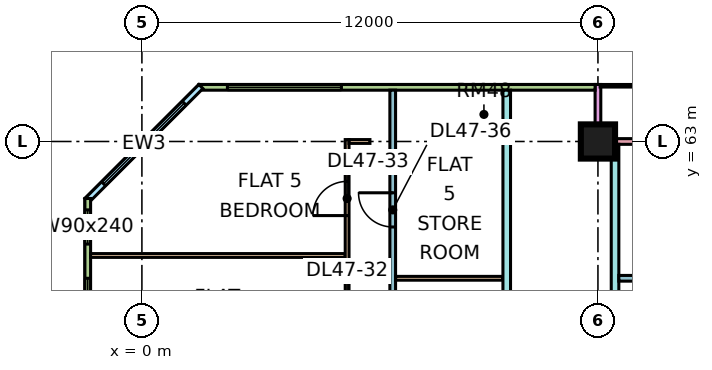
"""IFC4 building model, lengths in metres.
Left out: names, types, materials, properties, quantities, classifications, styles, units other than length and angle.
Written with IfcOpenShell. Run it as: python <this file> out.ifc"""

import sys

from ifc_helpers import new_model, si_unit, direction, frame, frame_2d, origin, origin_2d, place, context, subcontext, project, spatial, rectangle, extrude, element, fill, save


model = new_model("IFC4")
c1 = context("Model", 3, precision=1e-05, world=origin(), true_north=direction((0.0, 1.0)))
c2 = subcontext(c1, "Body", "Model", "MODEL_VIEW")
j1 = project(units=[si_unit("LENGTHUNIT", "METRE"), si_unit("PLANEANGLEUNIT", "RADIAN")], contexts=[c1])
p1 = place(None, origin())
s1 = spatial("IfcSite", under=j1, at=p1, CompositionType="ELEMENT")
p2 = place(p1, origin())
s2 = spatial("IfcBuilding", under=s1, at=p2, CompositionType="ELEMENT")
p3 = place(p2, frame((0.0, 0.0, 202.4)))
s3 = spatial("IfcBuildingStorey", under=s2, at=p3, CompositionType="ELEMENT", Elevation=202.4)
p4 = place(p3, frame((12.0, 63.0, 0.0), z_axis=(0.0, 0.0, 1.0), x_axis=(1.0, 0.0, 0.0)))
e1 = element("IfcColumn", 1, at=p4, inside=s3, PredefinedType="COLUMN", context=c2, shape_type="SweptSolid", body=[
    extrude(rectangle(XDim=0.9, YDim=0.9, at=origin_2d()), origin(), (0.0, 0.0, 1.0), 3.75),
])
p5 = place(p3, frame((22.425, 63.0, 0.0), z_axis=(0.0, 0.0, 1.0), x_axis=(-1.0, 0.0, 0.0)))
e2 = element("IfcWall", 2, at=p5, inside=s3, PredefinedType="SOLIDWALL", context=c2, shape_type="SweptSolid", body=[
    extrude(rectangle(XDim=10.35, YDim=0.15, at=frame_2d((5.175, 0.0))), origin(), (0.0, 0.0, 1.0), 3.3),
])
p6 = place(p5, frame((0.788, 0.0, 0.0)))
e3 = element("IfcOpeningElement", 3, at=p6, cuts=e2, PredefinedType="OPENING", context=c2, shape_type="SweptSolid", body=[
    extrude(rectangle(XDim=1.8, YDim=2.4, at=frame_2d((0.9, 1.2))), frame((0.0, 0.085, 0.0), z_axis=(0.0, -1.0, 0.0), x_axis=(1.0, 0.0, 0.0)), (0.0, 0.0, 1.0), 0.17),
])
p7 = place(p5, frame((5.725, 0.0, 0.45)))
e4 = element("IfcOpeningElement", 4, at=p7, cuts=e2, PredefinedType="OPENING", context=c2, shape_type="SweptSolid", body=[
    extrude(rectangle(XDim=3.0, YDim=2.4, at=frame_2d((1.5, 1.2))), frame((0.0, 0.085, 0.0), z_axis=(0.0, -1.0, 0.0), x_axis=(1.0, 0.0, 0.0)), (0.0, 0.0, 1.0), 0.17),
])
p8 = place(p3, frame((12.0, 64.5, 0.0), z_axis=(0.0, 0.0, 1.0), x_axis=(0.0, -1.0, 0.0)))
e5 = element("IfcWall", 5, at=p8, inside=s3, PredefinedType="SOLIDWALL", context=c2, shape_type="SweptSolid", body=[
    extrude(rectangle(XDim=1.5, YDim=0.15, at=frame_2d((0.75, 0.0))), origin(), (0.0, 0.0, 1.0), 3.3),
])
p9 = place(p3, frame((11.925, 64.425, 0.0), z_axis=(0.0, 0.0, 1.0), x_axis=(-1.0, 0.0, 0.0)))
e6 = element("IfcWall", 6, at=p9, inside=s3, PredefinedType="SOLIDWALL", context=c2, shape_type="SweptSolid", body=[
    extrude(rectangle(XDim=10.425, YDim=0.15, at=frame_2d((5.212, 0.0))), origin(), (0.0, 0.0, 1.0), 3.3),
])
p10 = place(p9, frame((6.675, 0.0, 0.45)))
e7 = element("IfcOpeningElement", 7, at=p10, cuts=e6, PredefinedType="OPENING", context=c2, shape_type="SweptSolid", body=[
    extrude(rectangle(XDim=3.0, YDim=2.4, at=frame_2d((1.5, 1.2))), frame((0.0, 0.085, 0.0), z_axis=(0.0, -1.0, 0.0), x_axis=(1.0, 0.0, 0.0)), (0.0, 0.0, 1.0), 0.17),
])
p11 = place(p3, frame((1.553, 64.447, 0.0), z_axis=(0.0, 0.0, 1.0), x_axis=(-0.707106781187, -0.707106781187, 0.0)))
e8 = element("IfcWall", 8, at=p11, inside=s3, PredefinedType="SOLIDWALL", context=c2, shape_type="SweptSolid", body=[
    extrude(rectangle(XDim=4.243, YDim=0.15, at=frame_2d((2.121, 0.0))), origin(), (0.0, 0.0, 1.0), 3.3),
])
p12 = place(p11, frame((0.621, 0.0, 0.45)))
e9 = element("IfcOpeningElement", 9, at=p12, cuts=e8, PredefinedType="OPENING", context=c2, shape_type="SweptSolid", body=[
    extrude(rectangle(XDim=3.0, YDim=2.4, at=frame_2d((1.5, 1.2))), frame((0.0, 0.085, 0.0), z_axis=(0.0, -1.0, 0.0), x_axis=(1.0, 0.0, 0.0)), (0.0, 0.0, 1.0), 0.17),
])
p13 = place(p3, frame((-1.425, 61.5, 0.0), z_axis=(0.0, 0.0, 1.0), x_axis=(0.0, -1.0, 0.0)))
e10 = element("IfcWall", 10, at=p13, inside=s3, PredefinedType="SOLIDWALL", context=c2, shape_type="SweptSolid", body=[
    extrude(rectangle(XDim=13.425, YDim=0.15, at=frame_2d((6.712, 0.0))), origin(), (0.0, 0.0, 1.0), 3.3),
])
p14 = place(p13, frame((0.3, 0.0, 0.45)))
e11 = element("IfcOpeningElement", 11, at=p14, cuts=e10, PredefinedType="OPENING", context=c2, shape_type="SweptSolid", body=[
    extrude(rectangle(XDim=0.9, YDim=2.4, at=frame_2d((0.45, 1.2))), frame((0.0, 0.085, 0.0), z_axis=(0.0, -1.0, 0.0), x_axis=(1.0, 0.0, 0.0)), (0.0, 0.0, 1.0), 0.17),
])
p15 = place(p13, frame((2.1, 0.0, 0.45)))
e12 = element("IfcOpeningElement", 12, at=p15, cuts=e10, PredefinedType="OPENING", context=c2, shape_type="SweptSolid", body=[
    extrude(rectangle(XDim=1.8, YDim=2.4, at=frame_2d((0.9, 1.2))), frame((0.0, 0.085, 0.0), z_axis=(0.0, -1.0, 0.0), x_axis=(1.0, 0.0, 0.0)), (0.0, 0.0, 1.0), 0.17),
])
p16 = place(p13, frame((5.1, 0.0, 0.45)))
e13 = element("IfcOpeningElement", 13, at=p16, cuts=e10, PredefinedType="OPENING", context=c2, shape_type="SweptSolid", body=[
    extrude(rectangle(XDim=4.8, YDim=2.4, at=frame_2d((2.4, 1.2))), frame((0.0, 0.085, 0.0), z_axis=(0.0, -1.0, 0.0), x_axis=(1.0, 0.0, 0.0)), (0.0, 0.0, 1.0), 0.17),
])
p17 = place(p13, frame((11.062, 0.0, 0.45)))
e14 = element("IfcOpeningElement", 14, at=p17, cuts=e10, PredefinedType="OPENING", context=c2, shape_type="SweptSolid", body=[
    extrude(rectangle(XDim=1.8, YDim=2.4, at=frame_2d((0.9, 1.2))), frame((0.0, 0.085, 0.0), z_axis=(0.0, -1.0, 0.0), x_axis=(1.0, 0.0, 0.0)), (0.0, 0.0, 1.0), 0.17),
])
p18 = place(p3, frame((-1.351, 60.0, 0.0), z_axis=(0.0, 0.0, 1.0), x_axis=(1.0, 0.0, 0.0)))
e15 = element("IfcWall", 15, at=p18, inside=s3, PredefinedType="PARTITIONING", context=c2, shape_type="SweptSolid", body=[
    extrude(rectangle(XDim=6.701, YDim=0.1, at=frame_2d((3.351, 0.0))), origin(), (0.0, 0.0, 1.0), 3.3),
])
p19 = place(p3, frame((5.4, 56.95, 0.0), z_axis=(0.0, 0.0, 1.0), x_axis=(0.0, 1.0, 0.0)))
e16 = element("IfcWall", 16, at=p19, inside=s3, PredefinedType="PARTITIONING", context=c2, shape_type="SweptSolid", body=[
    extrude(rectangle(XDim=6.1, YDim=0.1, at=frame_2d((3.05, 0.0))), origin(), (0.0, 0.0, 1.0), 3.3),
])
p20 = place(p19, frame((1.1, 0.0, 0.0)))
e17 = element("IfcOpeningElement", 17, at=p20, cuts=e16, PredefinedType="OPENING", context=c2, shape_type="SweptSolid", body=[
    extrude(rectangle(XDim=0.9, YDim=2.1, at=frame_2d((0.45, 1.05))), frame((0.0, 0.06, 0.0), z_axis=(0.0, -1.0, 0.0), x_axis=(1.0, 0.0, 0.0)), (0.0, 0.0, 1.0), 0.12),
])
p21 = place(p19, frame((4.1, 0.0, 0.0)))
e18 = element("IfcOpeningElement", 18, at=p21, cuts=e16, PredefinedType="OPENING", context=c2, shape_type="SweptSolid", body=[
    extrude(rectangle(XDim=0.9, YDim=2.1, at=frame_2d((0.45, 1.05))), frame((0.0, 0.06, 0.0), z_axis=(0.0, -1.0, 0.0), x_axis=(1.0, 0.0, 0.0)), (0.0, 0.0, 1.0), 0.12),
])
p22 = place(p3, frame((5.45, 63.0, 0.0), z_axis=(0.0, 0.0, 1.0), x_axis=(1.0, 0.0, 0.0)))
e19 = element("IfcWall", 19, at=p22, inside=s3, PredefinedType="PARTITIONING", context=c2, shape_type="SweptSolid", body=[
    extrude(rectangle(XDim=0.55, YDim=0.1, at=frame_2d((0.275, 0.0))), origin(), (0.0, 0.0, 1.0), 3.3),
])
p23 = place(p3, frame((6.6, 51.225, 0.0), z_axis=(0.0, 0.0, 1.0), x_axis=(0.0, 1.0, 0.0)))
e20 = element("IfcWall", 20, at=p23, inside=s3, PredefinedType="PARTITIONING", context=c2, shape_type="SweptSolid", body=[
    extrude(rectangle(XDim=13.125, YDim=0.15, at=frame_2d((6.562, 0.0))), origin(), (0.0, 0.0, 1.0), 3.3),
])
p24 = place(p23, frame((4.725, 0.0, 0.0)))
e21 = element("IfcOpeningElement", 21, at=p24, cuts=e20, PredefinedType="OPENING", context=c2, shape_type="SweptSolid", body=[
    extrude(rectangle(XDim=0.9, YDim=2.1, at=frame_2d((0.45, 1.05))), frame((0.0, 0.085, 0.0), z_axis=(0.0, -1.0, 0.0), x_axis=(1.0, 0.0, 0.0)), (0.0, 0.0, 1.0), 0.17),
])
p25 = place(p23, frame((9.525, 0.0, 0.0)))
e22 = element("IfcOpeningElement", 22, at=p25, cuts=e20, PredefinedType="OPENING", context=c2, shape_type="SweptSolid", body=[
    extrude(rectangle(XDim=0.9, YDim=2.1, at=frame_2d((0.45, 1.05))), frame((0.0, 0.085, 0.0), z_axis=(0.0, -1.0, 0.0), x_axis=(1.0, 0.0, 0.0)), (0.0, 0.0, 1.0), 0.17),
])
p26 = place(p3, frame((6.675, 59.4, 0.0), z_axis=(0.0, 0.0, 1.0), x_axis=(1.0, 0.0, 0.0)))
e23 = element("IfcWall", 23, at=p26, inside=s3, PredefinedType="PARTITIONING", context=c2, shape_type="SweptSolid", body=[
    extrude(rectangle(XDim=2.825, YDim=0.1, at=frame_2d((1.413, 0.0))), origin(), (0.0, 0.0, 1.0), 3.3),
])
p27 = place(p3, frame((9.6, 20.0, 0.0), z_axis=(0.0, 0.0, 1.0), x_axis=(0.0, 1.0, 0.0)))
e24 = element("IfcWall", 24, at=p27, inside=s3, PredefinedType="PARTITIONING", context=c2, shape_type="SweptSolid", body=[
    extrude(rectangle(XDim=44.35, YDim=0.2, at=frame_2d((22.175, 0.0))), origin(), (0.0, 0.0, 1.0), 3.3),
])
p28 = place(p27, frame((17.1, 0.0, 0.0)))
e25 = element("IfcOpeningElement", 25, at=p28, cuts=e24, PredefinedType="OPENING", context=c2, shape_type="SweptSolid", body=[
    extrude(rectangle(XDim=1.0, YDim=2.1, at=frame_2d((0.5, 1.05))), frame((0.0, 0.11, 0.0), z_axis=(0.0, -1.0, 0.0), x_axis=(1.0, 0.0, 0.0)), (0.0, 0.0, 1.0), 0.22),
])
p29 = place(p27, frame((29.1, 0.0, 0.0)))
e26 = element("IfcOpeningElement", 26, at=p29, cuts=e24, PredefinedType="OPENING", context=c2, shape_type="SweptSolid", body=[
    extrude(rectangle(XDim=1.0, YDim=2.1, at=frame_2d((0.5, 1.05))), frame((0.0, 0.11, 0.0), z_axis=(0.0, -1.0, 0.0), x_axis=(1.0, 0.0, 0.0)), (0.0, 0.0, 1.0), 0.22),
])
p30 = place(p27, frame((0.6, 0.0, 0.0)))
e27 = element("IfcOpeningElement", 27, at=p30, cuts=e24, PredefinedType="OPENING", context=c2, shape_type="SweptSolid", body=[
    extrude(rectangle(XDim=1.2, YDim=2.1, at=frame_2d((0.6, 1.05))), frame((0.0, 0.11, 0.0), z_axis=(0.0, -1.0, 0.0), x_axis=(1.0, 0.0, 0.0)), (0.0, 0.0, 1.0), 0.22),
])
p31 = place(p27, frame((4.35, 0.0, 0.0)))
e28 = element("IfcOpeningElement", 28, at=p31, cuts=e24, PredefinedType="OPENING", context=c2, shape_type="SweptSolid", body=[
    extrude(rectangle(XDim=1.0, YDim=2.1, at=frame_2d((0.5, 1.05))), frame((0.0, 0.11, 0.0), z_axis=(0.0, -1.0, 0.0), x_axis=(1.0, 0.0, 0.0)), (0.0, 0.0, 1.0), 0.22),
])
p32 = place(p3, frame((12.45, 20.0, 0.0), z_axis=(0.0, 0.0, 1.0), x_axis=(0.0, 1.0, 0.0)))
e29 = element("IfcWall", 29, at=p32, inside=s3, PredefinedType="PARTITIONING", context=c2, shape_type="SweptSolid", body=[
    extrude(rectangle(XDim=42.926, YDim=0.2, at=frame_2d((21.463, 0.0))), origin(), (0.0, 0.0, 1.0), 3.3),
])
p33 = place(p32, frame((7.15, 0.0, 0.0)))
e30 = element("IfcOpeningElement", 30, at=p33, cuts=e29, PredefinedType="OPENING", context=c2, shape_type="SweptSolid", body=[
    extrude(rectangle(XDim=1.6, YDim=2.1, at=frame_2d((0.8, 1.05))), frame((0.0, 0.11, 0.0), z_axis=(0.0, -1.0, 0.0), x_axis=(1.0, 0.0, 0.0)), (0.0, 0.0, 1.0), 0.22),
])
p34 = place(p32, frame((13.5, 0.0, 0.0)))
e31 = element("IfcOpeningElement", 31, at=p34, cuts=e29, PredefinedType="OPENING", context=c2, shape_type="SweptSolid", body=[
    extrude(rectangle(XDim=1.0, YDim=2.1, at=frame_2d((0.5, 1.05))), frame((0.0, 0.11, 0.0), z_axis=(0.0, -1.0, 0.0), x_axis=(1.0, 0.0, 0.0)), (0.0, 0.0, 1.0), 0.22),
])
p35 = place(p32, frame((17.2, 0.0, 0.0)))
e32 = element("IfcOpeningElement", 32, at=p35, cuts=e29, PredefinedType="OPENING", context=c2, shape_type="SweptSolid", body=[
    extrude(rectangle(XDim=1.0, YDim=2.1, at=frame_2d((0.5, 1.05))), frame((0.0, 0.11, 0.0), z_axis=(0.0, -1.0, 0.0), x_axis=(1.0, 0.0, 0.0)), (0.0, 0.0, 1.0), 0.22),
])
p36 = place(p32, frame((35.2, 0.0, 0.0)))
e33 = element("IfcOpeningElement", 33, at=p36, cuts=e29, PredefinedType="OPENING", context=c2, shape_type="SweptSolid", body=[
    extrude(rectangle(XDim=1.0, YDim=2.1, at=frame_2d((0.5, 1.05))), frame((0.0, 0.11, 0.0), z_axis=(0.0, -1.0, 0.0), x_axis=(1.0, 0.0, 0.0)), (0.0, 0.0, 1.0), 0.22),
])
p37 = place(p32, frame((1.15, 0.0, 0.0)))
e34 = element("IfcOpeningElement", 34, at=p37, cuts=e29, PredefinedType="OPENING", context=c2, shape_type="SweptSolid", body=[
    extrude(rectangle(XDim=1.8, YDim=2.1, at=frame_2d((0.9, 1.05))), frame((0.0, 0.11, 0.0), z_axis=(0.0, -1.0, 0.0), x_axis=(1.0, 0.0, 0.0)), (0.0, 0.0, 1.0), 0.22),
])
p38 = place(p32, frame((28.6, 0.0, 0.0)))
e35 = element("IfcOpeningElement", 35, at=p38, cuts=e29, PredefinedType="OPENING", context=c2, shape_type="SweptSolid", body=[
    extrude(rectangle(XDim=1.8, YDim=2.1, at=frame_2d((0.9, 1.05))), frame((0.0, 0.11, 0.0), z_axis=(0.0, -1.0, 0.0), x_axis=(1.0, 0.0, 0.0)), (0.0, 0.0, 1.0), 0.22),
])
p39 = place(p3, frame((12.55, 59.4, 0.0), z_axis=(0.0, 0.0, 1.0), x_axis=(1.0, 0.0, 0.0)))
e36 = element("IfcWall", 36, at=p39, inside=s3, PredefinedType="PARTITIONING", context=c2, shape_type="SweptSolid", body=[
    extrude(rectangle(XDim=5.225, YDim=0.15, at=frame_2d((2.612, 0.0))), origin(), (0.0, 0.0, 1.0), 3.3),
])
p40 = place(p10, origin())
e37 = element("IfcWindow", 37, at=p40, inside=s3, PartitioningType="SINGLE_PANEL", PredefinedType="WINDOW", context=c2, shape_type="SweptSolid", body=[
    extrude(rectangle(XDim=3.0, YDim=2.4, at=frame_2d((1.5, 1.2))), frame((0.0, 0.03, 0.0), z_axis=(0.0, -1.0, 0.0), x_axis=(1.0, 0.0, 0.0)), (0.0, 0.0, 1.0), 0.06),
])
fill(e7, e37)
p41 = place(p12, origin())
e38 = element("IfcWindow", 38, at=p41, inside=s3, PartitioningType="SINGLE_PANEL", PredefinedType="WINDOW", context=c2, shape_type="SweptSolid", body=[
    extrude(rectangle(XDim=3.0, YDim=2.4, at=frame_2d((1.5, 1.2))), frame((0.0, 0.03, 0.0), z_axis=(0.0, -1.0, 0.0), x_axis=(1.0, 0.0, 0.0)), (0.0, 0.0, 1.0), 0.06),
])
fill(e9, e38)
p42 = place(p14, origin())
e39 = element("IfcWindow", 39, at=p42, inside=s3, PartitioningType="SINGLE_PANEL", PredefinedType="WINDOW", context=c2, shape_type="SweptSolid", body=[
    extrude(rectangle(XDim=0.9, YDim=2.4, at=frame_2d((0.45, 1.2))), frame((0.0, 0.03, 0.0), z_axis=(0.0, -1.0, 0.0), x_axis=(1.0, 0.0, 0.0)), (0.0, 0.0, 1.0), 0.06),
])
fill(e11, e39)
p43 = place(p15, origin())
e40 = element("IfcWindow", 40, at=p43, inside=s3, PartitioningType="SINGLE_PANEL", PredefinedType="WINDOW", context=c2, shape_type="SweptSolid", body=[
    extrude(rectangle(XDim=1.8, YDim=2.4, at=frame_2d((0.9, 1.2))), frame((0.0, 0.03, 0.0), z_axis=(0.0, -1.0, 0.0), x_axis=(1.0, 0.0, 0.0)), (0.0, 0.0, 1.0), 0.06),
])
fill(e12, e40)
p44 = place(p21, origin())
e41 = element("IfcDoor", 41, at=p44, inside=s3, OperationType="SINGLE_SWING_LEFT", PredefinedType="DOOR", context=c2, shape_type="SweptSolid", body=[
    extrude(rectangle(XDim=0.9, YDim=2.1, at=frame_2d((0.45, 1.05))), frame((0.0, 0.025, 0.0), z_axis=(0.0, -1.0, 0.0), x_axis=(1.0, 0.0, 0.0)), (0.0, 0.0, 1.0), 0.05),
])
fill(e18, e41)
p45 = place(p25, frame((0.9, 0.0, 0.0), z_axis=(0.0, 0.0, 1.0), x_axis=(-1.0, 0.0, 0.0)))
e42 = element("IfcDoor", 42, at=p45, inside=s3, OperationType="SINGLE_SWING_RIGHT", PredefinedType="DOOR", context=c2, shape_type="SweptSolid", body=[
    extrude(rectangle(XDim=0.9, YDim=2.1, at=frame_2d((0.45, 1.05))), frame((0.0, 0.025, 0.0), z_axis=(0.0, -1.0, 0.0), x_axis=(1.0, 0.0, 0.0)), (0.0, 0.0, 1.0), 0.05),
])
fill(e22, e42)
save(model, sys.argv[1])
